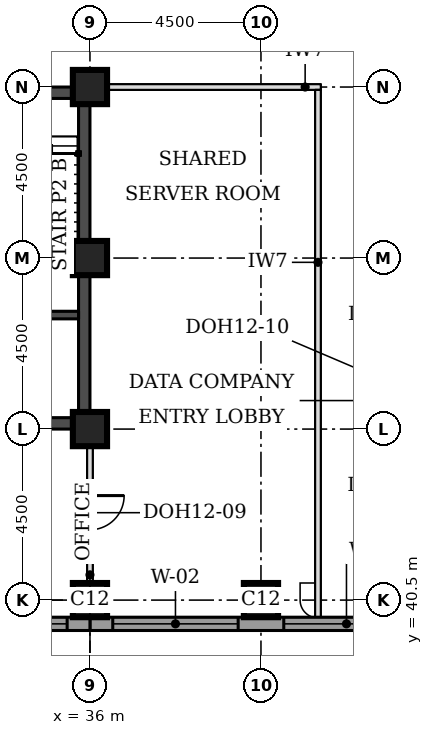
"""IFC4 building model, lengths in metres.
Left out: names, types, materials, properties, quantities, classifications, styles, units other than length and angle.
Written with IfcOpenShell. Run it as: python <this file> out.ifc"""

import sys

from ifc_helpers import new_model, si_unit, direction, frame, frame_2d, origin, origin_2d, place, context, subcontext, project, spatial, rectangle, extrude, element, fill, save


model = new_model("IFC4")
c1 = context("Model", 3, precision=1e-05, world=origin(), true_north=direction((0.0, 1.0)))
c2 = subcontext(c1, "Body", "Model", "MODEL_VIEW")
j1 = project(units=[si_unit("LENGTHUNIT", "METRE"), si_unit("PLANEANGLEUNIT", "RADIAN")], contexts=[c1])
p1 = place(None, origin())
s1 = spatial("IfcSite", under=j1, at=p1, CompositionType="ELEMENT")
p2 = place(p1, origin())
s2 = spatial("IfcBuilding", under=s1, at=p2, CompositionType="ELEMENT")
p3 = place(p2, frame((0.0, 0.0, 252.6)))
s3 = spatial("IfcBuildingStorey", under=s2, at=p3, CompositionType="ELEMENT", Elevation=252.6)
for number, where, z_axis, x_axis in (
    (1, (36.0, 40.5, 0.0), (0.0, 0.0, 1.0), (1.0, 0.0, 0.0)),
    (2, (40.5, 40.5, 0.0), (0.0, 0.0, 1.0), (1.0, 0.0, 0.0)),
    (3, (36.0, 45.0, 0.0), (0.0, 0.0, 1.0), (1.0, 0.0, 0.0)),
    (4, (36.0, 49.5, 0.0), (0.0, 0.0, 1.0), (1.0, 0.0, 0.0)),
    (5, (36.0, 54.0, 0.0), (0.0, 0.0, 1.0), (1.0, 0.0, 0.0)),
):
    element("IfcColumn", number, at=place(p3, frame(where, z_axis=z_axis, x_axis=x_axis)), inside=s3, PredefinedType="COLUMN", context=c2, shape_type="SweptSolid", body=[
        extrude(rectangle(XDim=0.9, YDim=0.9, at=origin_2d()), origin(), (0.0, 0.0, 1.0), 3.7),
    ])
p4 = place(p3, frame((27.3, 45.15, 0.0), z_axis=(0.0, 0.0, 1.0), x_axis=(1.0, 0.0, 0.0)))
e6 = element("IfcWall", 6, at=p4, inside=s3, PredefinedType="SHEAR", context=c2, shape_type="SweptSolid", body=[
    extrude(rectangle(XDim=8.4, YDim=0.3, at=frame_2d((4.2, 0.0))), origin(), (0.0, 0.0, 1.0), 3.7),
])
p5 = place(p4, frame((5.2, 0.0, 0.0)))
e7 = element("IfcOpeningElement", 7, at=p5, cuts=e6, PredefinedType="OPENING", context=c2, shape_type="SweptSolid", body=[
    extrude(rectangle(XDim=1.0, YDim=2.1, at=frame_2d((0.5, 1.05))), frame((0.0, 0.16, 0.0), z_axis=(0.0, -1.0, 0.0), x_axis=(1.0, 0.0, 0.0)), (0.0, 0.0, 1.0), 0.32),
])
p6 = place(p3, frame((27.3, 53.85, 0.0), z_axis=(0.0, 0.0, 1.0), x_axis=(1.0, 0.0, 0.0)))
e8 = element("IfcWall", 8, at=p6, inside=s3, PredefinedType="SHEAR", context=c2, shape_type="SweptSolid", body=[
    extrude(rectangle(XDim=8.4, YDim=0.3, at=frame_2d((4.2, 0.0))), origin(), (0.0, 0.0, 1.0), 3.7),
])
p7 = place(p6, frame((6.4, 0.0, 0.0)))
e9 = element("IfcOpeningElement", 9, at=p7, cuts=e8, PredefinedType="OPENING", context=c2, shape_type="SweptSolid", body=[
    extrude(rectangle(XDim=1.1, YDim=2.1, at=frame_2d((0.55, 1.05))), frame((0.0, 0.16, 0.0), z_axis=(0.0, -1.0, 0.0), x_axis=(1.0, 0.0, 0.0)), (0.0, 0.0, 1.0), 0.32),
])
p8 = place(p3, frame((35.85, 45.0, 0.0), z_axis=(0.0, 0.0, 1.0), x_axis=(0.0, 1.0, 0.0)))
e10 = element("IfcWall", 10, at=p8, inside=s3, PredefinedType="SHEAR", context=c2, shape_type="SweptSolid", body=[
    extrude(rectangle(XDim=9.0, YDim=0.3, at=frame_2d((4.5, 0.0))), origin(), (0.0, 0.0, 1.0), 3.7),
])
p9 = place(p3, frame((36.0, 39.875, 0.0), z_axis=(0.0, 0.0, 1.0), x_axis=(1.0, 0.0, 0.0)))
e11 = element("IfcWall", 11, at=p9, inside=s3, PredefinedType="STANDARD", context=c2, shape_type="SweptSolid", body=[
    extrude(rectangle(XDim=36.331, YDim=0.35, at=frame_2d((18.166, 0.0))), origin(), (0.0, 0.0, 1.0), 3.525),
])
p10 = place(p9, frame((0.6, 0.0, 0.9)))
e12 = element("IfcOpeningElement", 12, at=p10, cuts=e11, PredefinedType="OPENING", context=c2, shape_type="SweptSolid", body=[
    extrude(rectangle(XDim=3.3, YDim=1.9, at=frame_2d((1.65, 0.95))), frame((0.0, 0.185, 0.0), z_axis=(0.0, -1.0, 0.0), x_axis=(1.0, 0.0, 0.0)), (0.0, 0.0, 1.0), 0.37),
])
p11 = place(p9, frame((5.1, 0.0, 0.9)))
e13 = element("IfcOpeningElement", 13, at=p11, cuts=e11, PredefinedType="OPENING", context=c2, shape_type="SweptSolid", body=[
    extrude(rectangle(XDim=3.3, YDim=1.9, at=frame_2d((1.65, 0.95))), frame((0.0, 0.185, 0.0), z_axis=(0.0, -1.0, 0.0), x_axis=(1.0, 0.0, 0.0)), (0.0, 0.0, 1.0), 0.37),
])
p12 = place(p9, frame((9.6, 0.0, 0.9)))
e14 = element("IfcOpeningElement", 14, at=p12, cuts=e11, PredefinedType="OPENING", context=c2, shape_type="SweptSolid", body=[
    extrude(rectangle(XDim=3.3, YDim=1.9, at=frame_2d((1.65, 0.95))), frame((0.0, 0.185, 0.0), z_axis=(0.0, -1.0, 0.0), x_axis=(1.0, 0.0, 0.0)), (0.0, 0.0, 1.0), 0.37),
])
p13 = place(p9, frame((14.1, 0.0, 0.9)))
e15 = element("IfcOpeningElement", 15, at=p13, cuts=e11, PredefinedType="OPENING", context=c2, shape_type="SweptSolid", body=[
    extrude(rectangle(XDim=3.3, YDim=1.9, at=frame_2d((1.65, 0.95))), frame((0.0, 0.185, 0.0), z_axis=(0.0, -1.0, 0.0), x_axis=(1.0, 0.0, 0.0)), (0.0, 0.0, 1.0), 0.37),
])
p14 = place(p9, frame((18.6, 0.0, 0.9)))
e16 = element("IfcOpeningElement", 16, at=p14, cuts=e11, PredefinedType="OPENING", context=c2, shape_type="SweptSolid", body=[
    extrude(rectangle(XDim=3.3, YDim=1.9, at=frame_2d((1.65, 0.95))), frame((0.0, 0.185, 0.0), z_axis=(0.0, -1.0, 0.0), x_axis=(1.0, 0.0, 0.0)), (0.0, 0.0, 1.0), 0.37),
])
p15 = place(p9, frame((23.1, 0.0, 0.9)))
e17 = element("IfcOpeningElement", 17, at=p15, cuts=e11, PredefinedType="OPENING", context=c2, shape_type="SweptSolid", body=[
    extrude(rectangle(XDim=3.3, YDim=1.9, at=frame_2d((1.65, 0.95))), frame((0.0, 0.185, 0.0), z_axis=(0.0, -1.0, 0.0), x_axis=(1.0, 0.0, 0.0)), (0.0, 0.0, 1.0), 0.37),
])
p16 = place(p9, frame((27.6, 0.0, 0.9)))
e18 = element("IfcOpeningElement", 18, at=p16, cuts=e11, PredefinedType="OPENING", context=c2, shape_type="SweptSolid", body=[
    extrude(rectangle(XDim=3.3, YDim=1.9, at=frame_2d((1.65, 0.95))), frame((0.0, 0.185, 0.0), z_axis=(0.0, -1.0, 0.0), x_axis=(1.0, 0.0, 0.0)), (0.0, 0.0, 1.0), 0.37),
])
p17 = place(p9, frame((32.1, 0.0, 0.9)))
e19 = element("IfcOpeningElement", 19, at=p17, cuts=e11, PredefinedType="OPENING", context=c2, shape_type="SweptSolid", body=[
    extrude(rectangle(XDim=3.3, YDim=1.9, at=frame_2d((1.65, 0.95))), frame((0.0, 0.185, 0.0), z_axis=(0.0, -1.0, 0.0), x_axis=(1.0, 0.0, 0.0)), (0.0, 0.0, 1.0), 0.37),
])
p18 = place(p3, frame((17.669, 39.875, 0.0), z_axis=(0.0, 0.0, 1.0), x_axis=(1.0, 0.0, 0.0)))
e20 = element("IfcWall", 20, at=p18, inside=s3, PredefinedType="STANDARD", context=c2, shape_type="SweptSolid", body=[
    extrude(rectangle(XDim=18.331, YDim=0.35, at=frame_2d((9.166, 0.0))), origin(), (0.0, 0.0, 1.0), 3.525),
])
p19 = place(p18, frame((0.931, 0.0, 0.9)))
e21 = element("IfcOpeningElement", 21, at=p19, cuts=e20, PredefinedType="OPENING", context=c2, shape_type="SweptSolid", body=[
    extrude(rectangle(XDim=3.3, YDim=1.9, at=frame_2d((1.65, 0.95))), frame((0.0, 0.185, 0.0), z_axis=(0.0, -1.0, 0.0), x_axis=(1.0, 0.0, 0.0)), (0.0, 0.0, 1.0), 0.37),
])
p20 = place(p18, frame((5.431, 0.0, 0.9)))
e22 = element("IfcOpeningElement", 22, at=p20, cuts=e20, PredefinedType="OPENING", context=c2, shape_type="SweptSolid", body=[
    extrude(rectangle(XDim=3.3, YDim=1.9, at=frame_2d((1.65, 0.95))), frame((0.0, 0.185, 0.0), z_axis=(0.0, -1.0, 0.0), x_axis=(1.0, 0.0, 0.0)), (0.0, 0.0, 1.0), 0.37),
])
p21 = place(p18, frame((9.931, 0.0, 0.9)))
e23 = element("IfcOpeningElement", 23, at=p21, cuts=e20, PredefinedType="OPENING", context=c2, shape_type="SweptSolid", body=[
    extrude(rectangle(XDim=3.3, YDim=1.9, at=frame_2d((1.65, 0.95))), frame((0.0, 0.185, 0.0), z_axis=(0.0, -1.0, 0.0), x_axis=(1.0, 0.0, 0.0)), (0.0, 0.0, 1.0), 0.37),
])
p22 = place(p18, frame((14.431, 0.0, 0.9)))
e24 = element("IfcOpeningElement", 24, at=p22, cuts=e20, PredefinedType="OPENING", context=c2, shape_type="SweptSolid", body=[
    extrude(rectangle(XDim=3.3, YDim=1.9, at=frame_2d((1.65, 0.95))), frame((0.0, 0.185, 0.0), z_axis=(0.0, -1.0, 0.0), x_axis=(1.0, 0.0, 0.0)), (0.0, 0.0, 1.0), 0.37),
])
p23 = place(p3, frame((36.45, 54.0, 0.0), z_axis=(0.0, 0.0, 1.0), x_axis=(1.0, 0.0, 0.0)))
e25 = element("IfcWall", 25, at=p23, inside=s3, PredefinedType="PARTITIONING", context=c2, shape_type="SweptSolid", body=[
    extrude(rectangle(XDim=5.625, YDim=0.15, at=frame_2d((2.812, 0.0))), origin(), (0.0, 0.0, 1.0), 3.55),
])
p24 = place(p3, frame((42.0, 40.05, 0.0), z_axis=(0.0, 0.0, 1.0), x_axis=(0.0, 1.0, 0.0)))
e26 = element("IfcWall", 26, at=p24, inside=s3, PredefinedType="PARTITIONING", context=c2, shape_type="SweptSolid", body=[
    extrude(rectangle(XDim=13.875, YDim=0.15, at=frame_2d((6.938, 0.0))), origin(), (0.0, 0.0, 1.0), 3.55),
])
p25 = place(p3, frame((36.0, 40.95, 0.0), z_axis=(0.0, 0.0, 1.0), x_axis=(0.0, 1.0, 0.0)))
e27 = element("IfcWall", 27, at=p25, inside=s3, PredefinedType="PARTITIONING", context=c2, shape_type="SweptSolid", body=[
    extrude(rectangle(XDim=3.63, YDim=0.15, at=frame_2d((1.815, 0.0))), origin(), (0.0, 0.0, 1.0), 2.8),
])
p26 = place(p25, frame((1.4, 0.0, 0.0)))
e28 = element("IfcOpeningElement", 28, at=p26, cuts=e27, PredefinedType="OPENING", context=c2, shape_type="SweptSolid", body=[
    extrude(rectangle(XDim=0.9, YDim=2.1, at=frame_2d((0.45, 1.05))), frame((0.0, 0.085, 0.0), z_axis=(0.0, -1.0, 0.0), x_axis=(1.0, 0.0, 0.0)), (0.0, 0.0, 1.0), 0.17),
])
p27 = place(p3, frame((32.7, 48.0, 0.0), z_axis=(0.0, 0.0, 1.0), x_axis=(1.0, 0.0, 0.0)))
e29 = element("IfcWall", 29, at=p27, inside=s3, PredefinedType="SOLIDWALL", context=c2, shape_type="SweptSolid", body=[
    extrude(rectangle(XDim=3.0, YDim=0.2, at=frame_2d((1.5, 0.0))), origin(), (0.0, 0.0, 1.0), 3.55),
])
p28 = place(p10, origin())
e30 = element("IfcWindow", 30, at=p28, inside=s3, PartitioningType="SINGLE_PANEL", PredefinedType="WINDOW", context=c2, shape_type="SweptSolid", body=[
    extrude(rectangle(XDim=3.3, YDim=1.9, at=frame_2d((1.65, 0.95))), frame((0.0, 0.085, 0.0), z_axis=(0.0, -1.0, 0.0), x_axis=(1.0, 0.0, 0.0)), (0.0, 0.0, 1.0), 0.06),
])
fill(e12, e30)
p29 = place(p11, origin())
e31 = element("IfcWindow", 31, at=p29, inside=s3, PartitioningType="SINGLE_PANEL", PredefinedType="WINDOW", context=c2, shape_type="SweptSolid", body=[
    extrude(rectangle(XDim=3.3, YDim=1.9, at=frame_2d((1.65, 0.95))), frame((0.0, 0.085, 0.0), z_axis=(0.0, -1.0, 0.0), x_axis=(1.0, 0.0, 0.0)), (0.0, 0.0, 1.0), 0.06),
])
fill(e13, e31)
p30 = place(p22, origin())
e32 = element("IfcWindow", 32, at=p30, inside=s3, PartitioningType="SINGLE_PANEL", PredefinedType="WINDOW", context=c2, shape_type="SweptSolid", body=[
    extrude(rectangle(XDim=3.3, YDim=1.9, at=frame_2d((1.65, 0.95))), frame((0.0, 0.085, 0.0), z_axis=(0.0, -1.0, 0.0), x_axis=(1.0, 0.0, 0.0)), (0.0, 0.0, 1.0), 0.06),
])
fill(e24, e32)
p31 = place(p26, frame((0.9, 0.0, 0.0), z_axis=(0.0, 0.0, 1.0), x_axis=(-1.0, 0.0, 0.0)))
e33 = element("IfcDoor", 33, at=p31, inside=s3, OperationType="SINGLE_SWING_LEFT", PredefinedType="DOOR", context=c2, shape_type="SweptSolid", body=[
    extrude(rectangle(XDim=0.9, YDim=2.1, at=frame_2d((0.45, 1.05))), frame((0.0, 0.025, 0.0), z_axis=(0.0, -1.0, 0.0), x_axis=(1.0, 0.0, 0.0)), (0.0, 0.0, 1.0), 0.05),
])
fill(e28, e33)
save(model, sys.argv[1])
